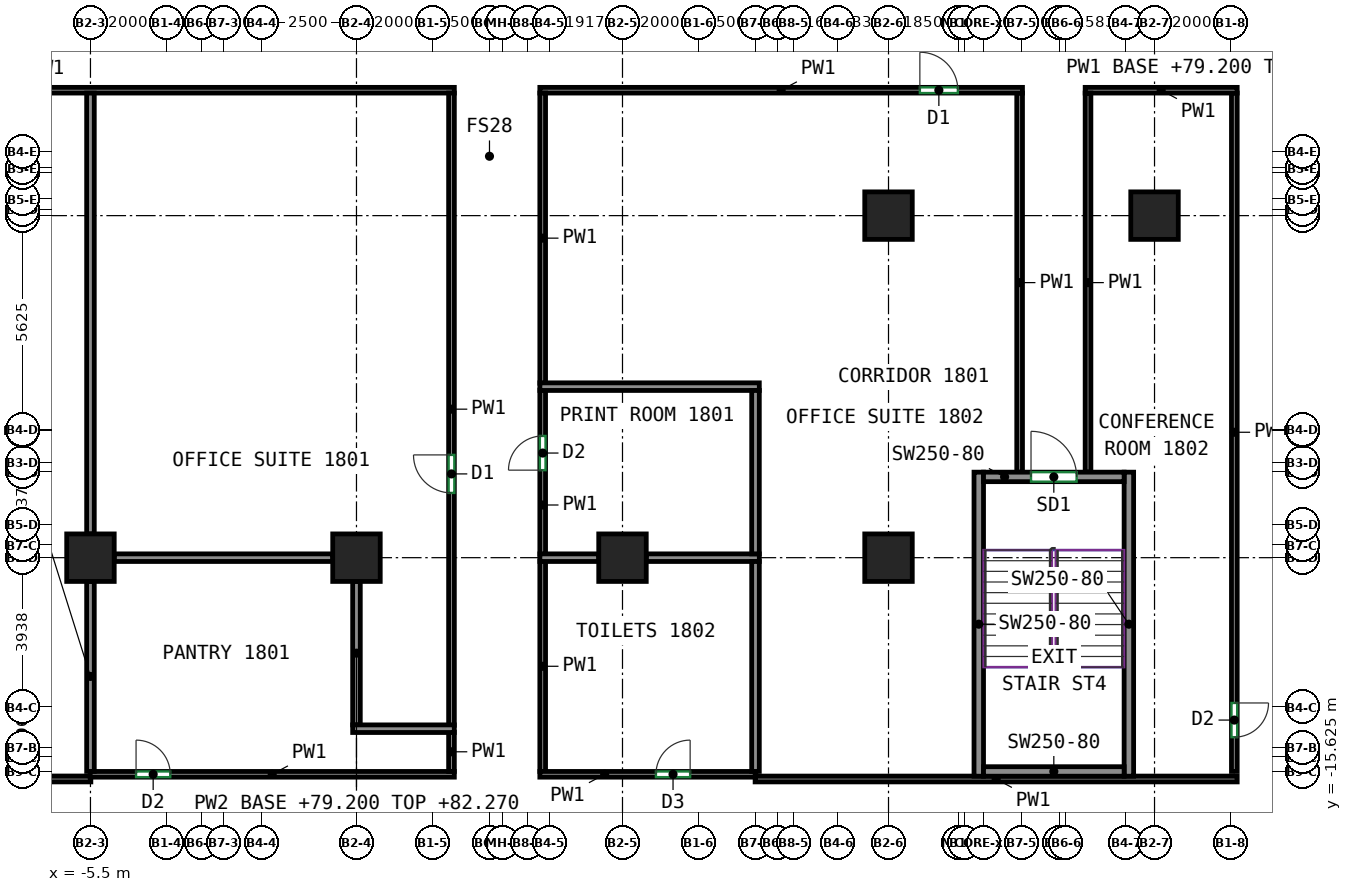
"""IFC4 building model, lengths in metres.
Left out: names, types, materials, properties, quantities, classifications, styles, units other than length and angle.
Written with IfcOpenShell. Run it as: python <this file> out.ifc"""

import sys

from ifc_helpers import new_model, si_unit, direction, frame, frame_2d, origin, origin_2d, place, context, subcontext, project, spatial, rectangle, extrude, source, transform, mapped, element, fill, save


model = new_model("IFC4")
c1 = context("Model", 3, precision=1e-05, world=origin(), true_north=direction((0.0, 1.0)))
c2 = subcontext(c1, "Body", "Model", "MODEL_VIEW")
j1 = project(units=[si_unit("LENGTHUNIT", "METRE"), si_unit("PLANEANGLEUNIT", "RADIAN")], contexts=[c1])
p1 = place(None, origin())
s1 = spatial("IfcSite", under=j1, at=p1, CompositionType="ELEMENT")
p2 = place(p1, origin())
s2 = spatial("IfcBuilding", under=s1, at=p2, CompositionType="ELEMENT")
p3 = place(p2, frame((0.0, 0.0, 79.2)))
s3 = spatial("IfcBuildingStorey", under=s2, at=p3, CompositionType="ELEMENT", Elevation=79.2)
m1 = source(origin(), c2, "Body", "SweptSolid", [
    extrude(rectangle(XDim=1.25, YDim=1.25, at=origin_2d()), origin(), (0.0, 0.0, 1.0), 3.72),
])
for number, where, z_axis, x_axis in (
    (1, (-5.5, -10.0, 0.0), (0.0, 0.0, 1.0), (1.0, 0.0, 0.0)),
    (2, (1.5, -10.0, 0.0), (0.0, 0.0, 1.0), (1.0, 0.0, 0.0)),
    (3, (8.5, -10.0, 0.0), (0.0, 0.0, 1.0), (1.0, 0.0, 0.0)),
    (4, (15.5, -10.0, 0.0), (0.0, 0.0, 1.0), (1.0, 0.0, 0.0)),
    (5, (15.5, -1.0, 0.0), (0.0, 0.0, 1.0), (1.0, 0.0, 0.0)),
    (6, (22.5, -1.0, 0.0), (0.0, 0.0, 1.0), (1.0, 0.0, 0.0)),
):
    element("IfcColumn", number, at=place(p3, frame(where, z_axis=z_axis, x_axis=x_axis)), inside=s3, PredefinedType="COLUMN", context=c2, shape_type="MappedRepresentation", body=[
        mapped(m1, transform((0.0, 0.0, 0.0))),
    ])
m2 = source(origin(), c2, "Body", "SweptSolid", [
    extrude(rectangle(XDim=8.0, YDim=0.25, at=frame_2d((4.0, 0.0))), origin(), (0.0, 0.0, 1.0), 3.72),
])
for number, where, z_axis, x_axis in (
    (7, (17.875, -15.75, 0.0), (0.0, 0.0, 1.0), (0.0, 1.0, 0.0)),
    (8, (21.825, -15.75, 0.0), (0.0, 0.0, 1.0), (0.0, 1.0, 0.0)),
):
    element("IfcWall", number, at=place(p3, frame(where, z_axis=z_axis, x_axis=x_axis)), inside=s3, PredefinedType="SHEAR", context=c2, shape_type="MappedRepresentation", body=[
        mapped(m2, transform((0.0, 0.0, 0.0))),
    ])
m3 = source(origin(), c2, "Body", "SweptSolid", [
    extrude(rectangle(XDim=3.7, YDim=0.25, at=frame_2d((1.85, 0.0))), origin(), (0.0, 0.0, 1.0), 3.72),
])
p4 = place(p3, frame((18.0, -15.625, 0.0), z_axis=(0.0, 0.0, 1.0), x_axis=(1.0, 0.0, 0.0)))
e9 = element("IfcWall", 9, at=p4, inside=s3, PredefinedType="SHEAR", context=c2, shape_type="MappedRepresentation", body=[
    mapped(m3, transform((0.0, 0.0, 0.0))),
])
p5 = place(p3, frame((18.0, -7.875, 0.0), z_axis=(0.0, 0.0, 1.0), x_axis=(1.0, 0.0, 0.0)))
e10 = element("IfcWall", 10, at=p5, inside=s3, PredefinedType="SHEAR", context=c2, shape_type="MappedRepresentation", body=[
    mapped(m3, transform((0.0, 0.0, 0.0))),
])
p6 = place(p5, frame((1.25, 0.0, 0.0)))
e11 = element("IfcOpeningElement", 11, at=p6, cuts=e10, PredefinedType="OPENING", context=c2, shape_type="SweptSolid", body=[
    extrude(rectangle(XDim=1.2, YDim=2.1, at=frame_2d((0.6, 1.05))), frame((0.0, 0.135, 0.0), z_axis=(0.0, -1.0, 0.0), x_axis=(1.0, 0.0, 0.0)), (0.0, 0.0, 1.0), 0.27),
])
p7 = place(p3, frame((-14.9, -15.825, 0.0), z_axis=(0.0, 0.0, 1.0), x_axis=(1.0, 0.0, 0.0)))
e12 = element("IfcWall", 12, at=p7, inside=s3, PredefinedType="PARTITIONING", context=c2, shape_type="SweptSolid", body=[
    extrude(rectangle(XDim=9.41, YDim=0.15, at=frame_2d((4.705, 0.0))), origin(), (0.0, 0.0, 1.0), 3.72),
])
p8 = place(p3, frame((-19.325, 2.3, 0.0), z_axis=(0.0, 0.0, 1.0), x_axis=(1.0, 0.0, 0.0)))
e13 = element("IfcWall", 13, at=p8, inside=s3, PredefinedType="PARTITIONING", context=c2, shape_type="SweptSolid", body=[
    extrude(rectangle(XDim=23.4, YDim=0.15, at=frame_2d((11.7, 0.0))), origin(), (0.0, 0.0, 1.0), 3.72),
])
p9 = place(p8, frame((8.726, 0.0, 0.0)))
e14 = element("IfcOpeningElement", 14, at=p9, cuts=e13, PredefinedType="OPENING", context=c2, shape_type="SweptSolid", body=[
    extrude(rectangle(XDim=1.8, YDim=2.1, at=frame_2d((0.9, 1.05))), frame((0.0, 0.085, 0.0), z_axis=(0.0, -1.0, 0.0), x_axis=(1.0, 0.0, 0.0)), (0.0, 0.0, 1.0), 0.17),
])
p10 = place(p3, frame((-5.51, -15.7, 0.0), z_axis=(0.0, 0.0, 1.0), x_axis=(1.0, 0.0, 0.0)))
e15 = element("IfcWall", 15, at=p10, inside=s3, PredefinedType="PARTITIONING", context=c2, shape_type="SweptSolid", body=[
    extrude(rectangle(XDim=9.585, YDim=0.15, at=frame_2d((4.792, 0.0))), origin(), (0.0, 0.0, 1.0), 3.72),
])
p11 = place(p10, frame((1.21, 0.0, 0.0)))
e16 = element("IfcOpeningElement", 16, at=p11, cuts=e15, PredefinedType="OPENING", context=c2, shape_type="SweptSolid", body=[
    extrude(rectangle(XDim=0.9, YDim=2.1, at=frame_2d((0.45, 1.05))), frame((0.0, 0.085, 0.0), z_axis=(0.0, -1.0, 0.0), x_axis=(1.0, 0.0, 0.0)), (0.0, 0.0, 1.0), 0.17),
])
p12 = place(p3, frame((4.0, -15.625, 0.0), z_axis=(0.0, 0.0, 1.0), x_axis=(0.0, 1.0, 0.0)))
e17 = element("IfcWall", 17, at=p12, inside=s3, PredefinedType="PARTITIONING", context=c2, shape_type="SweptSolid", body=[
    extrude(rectangle(XDim=1.035, YDim=0.15, at=frame_2d((0.518, 0.0))), origin(), (0.0, 0.0, 1.0), 3.72),
])
p13 = place(p3, frame((4.0, -14.41, 0.0), z_axis=(0.0, 0.0, 1.0), x_axis=(0.0, 1.0, 0.0)))
e18 = element("IfcWall", 18, at=p13, inside=s3, PredefinedType="PARTITIONING", context=c2, shape_type="SweptSolid", body=[
    extrude(rectangle(XDim=16.635, YDim=0.15, at=frame_2d((8.317, 0.0))), origin(), (0.0, 0.0, 1.0), 3.72),
])
p14 = place(p13, frame((6.114, 0.0, 0.0)))
e19 = element("IfcOpeningElement", 19, at=p14, cuts=e18, PredefinedType="OPENING", context=c2, shape_type="SweptSolid", body=[
    extrude(rectangle(XDim=1.0, YDim=2.1, at=frame_2d((0.5, 1.05))), frame((0.0, 0.085, 0.0), z_axis=(0.0, -1.0, 0.0), x_axis=(1.0, 0.0, 0.0)), (0.0, 0.0, 1.0), 0.17),
])
p15 = place(p3, frame((6.4, -15.625, 0.0), z_axis=(0.0, 0.0, 1.0), x_axis=(0.0, 1.0, 0.0)))
e20 = element("IfcWall", 20, at=p15, inside=s3, PredefinedType="PARTITIONING", context=c2, shape_type="SweptSolid", body=[
    extrude(rectangle(XDim=5.535, YDim=0.15, at=frame_2d((2.768, 0.0))), origin(), (0.0, 0.0, 1.0), 3.72),
])
p16 = place(p3, frame((6.325, -15.7, 0.0), z_axis=(0.0, 0.0, 1.0), x_axis=(1.0, 0.0, 0.0)))
e21 = element("IfcWall", 21, at=p16, inside=s3, PredefinedType="PARTITIONING", context=c2, shape_type="SweptSolid", body=[
    extrude(rectangle(XDim=5.685, YDim=0.15, at=frame_2d((2.843, 0.0))), origin(), (0.0, 0.0, 1.0), 3.72),
])
p17 = place(p16, frame((3.055, 0.0, 0.0)))
e22 = element("IfcOpeningElement", 22, at=p17, cuts=e21, PredefinedType="OPENING", context=c2, shape_type="SweptSolid", body=[
    extrude(rectangle(XDim=0.9, YDim=2.1, at=frame_2d((0.45, 1.05))), frame((0.0, 0.085, 0.0), z_axis=(0.0, -1.0, 0.0), x_axis=(1.0, 0.0, 0.0)), (0.0, 0.0, 1.0), 0.17),
])
p18 = place(p3, frame((6.4, -9.91, 0.0), z_axis=(0.0, 0.0, 1.0), x_axis=(0.0, 1.0, 0.0)))
e23 = element("IfcWall", 23, at=p18, inside=s3, PredefinedType="PARTITIONING", context=c2, shape_type="SweptSolid", body=[
    extrude(rectangle(XDim=4.32, YDim=0.15, at=frame_2d((2.16, 0.0))), origin(), (0.0, 0.0, 1.0), 3.72),
])
p19 = place(p18, frame((2.213, 0.0, 0.0)))
e24 = element("IfcOpeningElement", 24, at=p19, cuts=e23, PredefinedType="OPENING", context=c2, shape_type="SweptSolid", body=[
    extrude(rectangle(XDim=0.9, YDim=2.1, at=frame_2d((0.45, 1.05))), frame((0.0, 0.085, 0.0), z_axis=(0.0, -1.0, 0.0), x_axis=(1.0, 0.0, 0.0)), (0.0, 0.0, 1.0), 0.17),
])
p20 = place(p3, frame((18.95, 2.225, 0.0), z_axis=(0.0, 0.0, 1.0), x_axis=(0.0, -1.0, 0.0)))
e25 = element("IfcWall", 25, at=p20, inside=s3, PredefinedType="PARTITIONING", context=c2, shape_type="SweptSolid", body=[
    extrude(rectangle(XDim=9.975, YDim=0.15, at=frame_2d((4.988, 0.0))), origin(), (0.0, 0.0, 1.0), 3.72),
])
p21 = place(p3, frame((6.325, 2.3, 0.0), z_axis=(0.0, 0.0, 1.0), x_axis=(1.0, 0.0, 0.0)))
e26 = element("IfcWall", 26, at=p21, inside=s3, PredefinedType="PARTITIONING", context=c2, shape_type="SweptSolid", body=[
    extrude(rectangle(XDim=12.7, YDim=0.15, at=frame_2d((6.35, 0.0))), origin(), (0.0, 0.0, 1.0), 3.72),
])
p22 = place(p21, frame((10.0, 0.0, 0.0)))
e27 = element("IfcOpeningElement", 27, at=p22, cuts=e26, PredefinedType="OPENING", context=c2, shape_type="SweptSolid", body=[
    extrude(rectangle(XDim=1.0, YDim=2.1, at=frame_2d((0.5, 1.05))), frame((0.0, 0.085, 0.0), z_axis=(0.0, -1.0, 0.0), x_axis=(1.0, 0.0, 0.0)), (0.0, 0.0, 1.0), 0.17),
])
p23 = place(p3, frame((6.4, -5.41, 0.0), z_axis=(0.0, 0.0, 1.0), x_axis=(0.0, 1.0, 0.0)))
e28 = element("IfcWall", 28, at=p23, inside=s3, PredefinedType="PARTITIONING", context=c2, shape_type="SweptSolid", body=[
    extrude(rectangle(XDim=7.635, YDim=0.15, at=frame_2d((3.817, 0.0))), origin(), (0.0, 0.0, 1.0), 3.72),
])
p24 = place(p3, frame((11.99, -15.825, 0.0), z_axis=(0.0, 0.0, 1.0), x_axis=(1.0, 0.0, 0.0)))
e29 = element("IfcWall", 29, at=p24, inside=s3, PredefinedType="PARTITIONING", context=c2, shape_type="SweptSolid", body=[
    extrude(rectangle(XDim=12.685, YDim=0.15, at=frame_2d((6.343, 0.0))), origin(), (0.0, 0.0, 1.0), 3.72),
])
p25 = place(p3, frame((24.6, 2.225, 0.0), z_axis=(0.0, 0.0, 1.0), x_axis=(0.0, -1.0, 0.0)))
e30 = element("IfcWall", 30, at=p25, inside=s3, PredefinedType="PARTITIONING", context=c2, shape_type="SweptSolid", body=[
    extrude(rectangle(XDim=17.85, YDim=0.15, at=frame_2d((8.925, 0.0))), origin(), (0.0, 0.0, 1.0), 3.72),
])
p26 = place(p25, frame((16.048, 0.0, 0.0)))
e31 = element("IfcOpeningElement", 31, at=p26, cuts=e30, PredefinedType="OPENING", context=c2, shape_type="SweptSolid", body=[
    extrude(rectangle(XDim=0.9, YDim=2.1, at=frame_2d((0.45, 1.05))), frame((0.0, 0.085, 0.0), z_axis=(0.0, -1.0, 0.0), x_axis=(1.0, 0.0, 0.0)), (0.0, 0.0, 1.0), 0.17),
])
p27 = place(p3, frame((20.675, 2.3, 0.0), z_axis=(0.0, 0.0, 1.0), x_axis=(1.0, 0.0, 0.0)))
e32 = element("IfcWall", 32, at=p27, inside=s3, PredefinedType="PARTITIONING", context=c2, shape_type="SweptSolid", body=[
    extrude(rectangle(XDim=4.0, YDim=0.15, at=frame_2d((2.0, 0.0))), origin(), (0.0, 0.0, 1.0), 3.72),
])
p28 = place(p3, frame((20.75, -7.75, 0.0), z_axis=(0.0, 0.0, 1.0), x_axis=(0.0, 1.0, 0.0)))
e33 = element("IfcWall", 33, at=p28, inside=s3, PredefinedType="PARTITIONING", context=c2, shape_type="SweptSolid", body=[
    extrude(rectangle(XDim=9.975, YDim=0.15, at=frame_2d((4.988, 0.0))), origin(), (0.0, 0.0, 1.0), 3.72),
])
p29 = place(p3, frame((-5.5, -15.624, 0.0), z_axis=(0.0, 0.0, 1.0), x_axis=(0.0, 1.0, 0.0)))
e34 = element("IfcWall", 34, at=p29, inside=s3, PredefinedType="PARTITIONING", context=c2, shape_type="SweptSolid", body=[
    extrude(rectangle(XDim=4.999, YDim=0.2, at=frame_2d((2.5, 0.0))), origin(), (0.0, 0.0, 1.0), 3.07),
])
p30 = place(p3, frame((-5.5, -9.375, 0.0), z_axis=(0.0, 0.0, 1.0), x_axis=(0.0, 1.0, 0.0)))
e35 = element("IfcWall", 35, at=p30, inside=s3, PredefinedType="PARTITIONING", context=c2, shape_type="SweptSolid", body=[
    extrude(rectangle(XDim=11.599, YDim=0.2, at=frame_2d((5.8, 0.0))), origin(), (0.0, 0.0, 1.0), 3.72),
])
p31 = place(p3, frame((-4.875, -10.0, 0.0), z_axis=(0.0, 0.0, 1.0), x_axis=(1.0, 0.0, 0.0)))
e36 = element("IfcWall", 36, at=p31, inside=s3, PredefinedType="PARTITIONING", context=c2, shape_type="SweptSolid", body=[
    extrude(rectangle(XDim=5.75, YDim=0.2, at=frame_2d((2.875, 0.0))), origin(), (0.0, 0.0, 1.0), 3.72),
])
p32 = place(p3, frame((1.5, -14.4, 0.0), z_axis=(0.0, 0.0, 1.0), x_axis=(0.0, 1.0, 0.0)))
e37 = element("IfcWall", 37, at=p32, inside=s3, PredefinedType="PARTITIONING", context=c2, shape_type="SweptSolid", body=[
    extrude(rectangle(XDim=3.775, YDim=0.2, at=frame_2d((1.887, 0.0))), origin(), (0.0, 0.0, 1.0), 3.07),
])
p33 = place(p3, frame((1.4, -14.5, 0.0), z_axis=(0.0, 0.0, 1.0), x_axis=(1.0, 0.0, 0.0)))
e38 = element("IfcWall", 38, at=p33, inside=s3, PredefinedType="PARTITIONING", context=c2, shape_type="SweptSolid", body=[
    extrude(rectangle(XDim=2.674, YDim=0.2, at=frame_2d((1.337, 0.0))), origin(), (0.0, 0.0, 1.0), 3.72),
])
p34 = place(p3, frame((6.326, -10.0, 0.0), z_axis=(0.0, 0.0, 1.0), x_axis=(1.0, 0.0, 0.0)))
e39 = element("IfcWall", 39, at=p34, inside=s3, PredefinedType="PARTITIONING", context=c2, shape_type="SweptSolid", body=[
    extrude(rectangle(XDim=1.549, YDim=0.2, at=frame_2d((0.774, 0.0))), origin(), (0.0, 0.0, 1.0), 3.72),
])
p35 = place(p3, frame((9.125, -10.0, 0.0), z_axis=(0.0, 0.0, 1.0), x_axis=(1.0, 0.0, 0.0)))
e40 = element("IfcWall", 40, at=p35, inside=s3, PredefinedType="PARTITIONING", context=c2, shape_type="SweptSolid", body=[
    extrude(rectangle(XDim=2.975, YDim=0.2, at=frame_2d((1.488, 0.0))), origin(), (0.0, 0.0, 1.0), 3.72),
])
p36 = place(p3, frame((12.0, -15.624, 0.0), z_axis=(0.0, 0.0, 1.0), x_axis=(0.0, 1.0, 0.0)))
e41 = element("IfcWall", 41, at=p36, inside=s3, PredefinedType="PARTITIONING", context=c2, shape_type="SweptSolid", body=[
    extrude(rectangle(XDim=5.524, YDim=0.2, at=frame_2d((2.762, 0.0))), origin(), (0.0, 0.0, 1.0), 3.72),
])
p37 = place(p3, frame((12.1, -5.5, 0.0), z_axis=(0.0, 0.0, 1.0), x_axis=(-1.0, 0.0, 0.0)))
e42 = element("IfcWall", 42, at=p37, inside=s3, PredefinedType="PARTITIONING", context=c2, shape_type="SweptSolid", body=[
    extrude(rectangle(XDim=5.774, YDim=0.2, at=frame_2d((2.887, 0.0))), origin(), (0.0, 0.0, 1.0), 3.72),
])
p38 = place(p3, frame((12.0, -9.9, 0.0), z_axis=(0.0, 0.0, 1.0), x_axis=(0.0, 1.0, 0.0)))
e43 = element("IfcWall", 43, at=p38, inside=s3, PredefinedType="PARTITIONING", context=c2, shape_type="SweptSolid", body=[
    extrude(rectangle(XDim=4.3, YDim=0.2, at=frame_2d((2.15, 0.0))), origin(), (0.0, 0.0, 1.0), 3.72),
])
p39 = place(p6, origin())
e44 = element("IfcDoor", 44, at=p39, inside=s3, OperationType="DOUBLE_DOOR_SINGLE_SWING", PredefinedType="DOOR", context=c2, shape_type="SweptSolid", body=[
    extrude(rectangle(XDim=1.2, YDim=2.1, at=frame_2d((0.6, 1.05))), frame((0.0, 0.025, 0.0), z_axis=(0.0, -1.0, 0.0), x_axis=(1.0, 0.0, 0.0)), (0.0, 0.0, 1.0), 0.05),
])
fill(e11, e44)
p40 = place(p11, origin())
e45 = element("IfcDoor", 45, at=p40, inside=s3, OperationType="SINGLE_SWING_LEFT", PredefinedType="DOOR", context=c2, shape_type="SweptSolid", body=[
    extrude(rectangle(XDim=0.9, YDim=2.1, at=frame_2d((0.45, 1.05))), frame((0.0, 0.025, 0.0), z_axis=(0.0, -1.0, 0.0), x_axis=(1.0, 0.0, 0.0)), (0.0, 0.0, 1.0), 0.05),
])
fill(e16, e45)
p41 = place(p17, origin())
e46 = element("IfcDoor", 46, at=p41, inside=s3, OperationType="SINGLE_SWING_RIGHT", PredefinedType="DOOR", context=c2, shape_type="SweptSolid", body=[
    extrude(rectangle(XDim=0.9, YDim=2.1, at=frame_2d((0.45, 1.05))), frame((0.0, 0.025, 0.0), z_axis=(0.0, -1.0, 0.0), x_axis=(1.0, 0.0, 0.0)), (0.0, 0.0, 1.0), 0.05),
])
fill(e22, e46)
p42 = place(p26, origin())
e47 = element("IfcDoor", 47, at=p42, inside=s3, OperationType="SINGLE_SWING_LEFT", PredefinedType="DOOR", context=c2, shape_type="SweptSolid", body=[
    extrude(rectangle(XDim=0.9, YDim=2.1, at=frame_2d((0.45, 1.05))), frame((0.0, 0.025, 0.0), z_axis=(0.0, -1.0, 0.0), x_axis=(1.0, 0.0, 0.0)), (0.0, 0.0, 1.0), 0.05),
])
fill(e31, e47)
p43 = place(p14, origin())
e48 = element("IfcDoor", 48, at=p43, inside=s3, OperationType="SINGLE_SWING_RIGHT", PredefinedType="DOOR", context=c2, shape_type="SweptSolid", body=[
    extrude(rectangle(XDim=1.0, YDim=2.1, at=frame_2d((0.5, 1.05))), frame((0.0, 0.025, 0.0), z_axis=(0.0, -1.0, 0.0), x_axis=(1.0, 0.0, 0.0)), (0.0, 0.0, 1.0), 0.05),
])
fill(e19, e48)
p44 = place(p19, origin())
e49 = element("IfcDoor", 49, at=p44, inside=s3, OperationType="SINGLE_SWING_LEFT", PredefinedType="DOOR", context=c2, shape_type="SweptSolid", body=[
    extrude(rectangle(XDim=0.9, YDim=2.1, at=frame_2d((0.45, 1.05))), frame((0.0, 0.025, 0.0), z_axis=(0.0, -1.0, 0.0), x_axis=(1.0, 0.0, 0.0)), (0.0, 0.0, 1.0), 0.05),
])
fill(e24, e49)
p45 = place(p22, origin())
e50 = element("IfcDoor", 50, at=p45, inside=s3, OperationType="SINGLE_SWING_LEFT", PredefinedType="DOOR", context=c2, shape_type="SweptSolid", body=[
    extrude(rectangle(XDim=1.0, YDim=2.1, at=frame_2d((0.5, 1.05))), frame((0.0, 0.025, 0.0), z_axis=(0.0, -1.0, 0.0), x_axis=(1.0, 0.0, 0.0)), (0.0, 0.0, 1.0), 0.05),
])
fill(e27, e50)
save(model, sys.argv[1])
